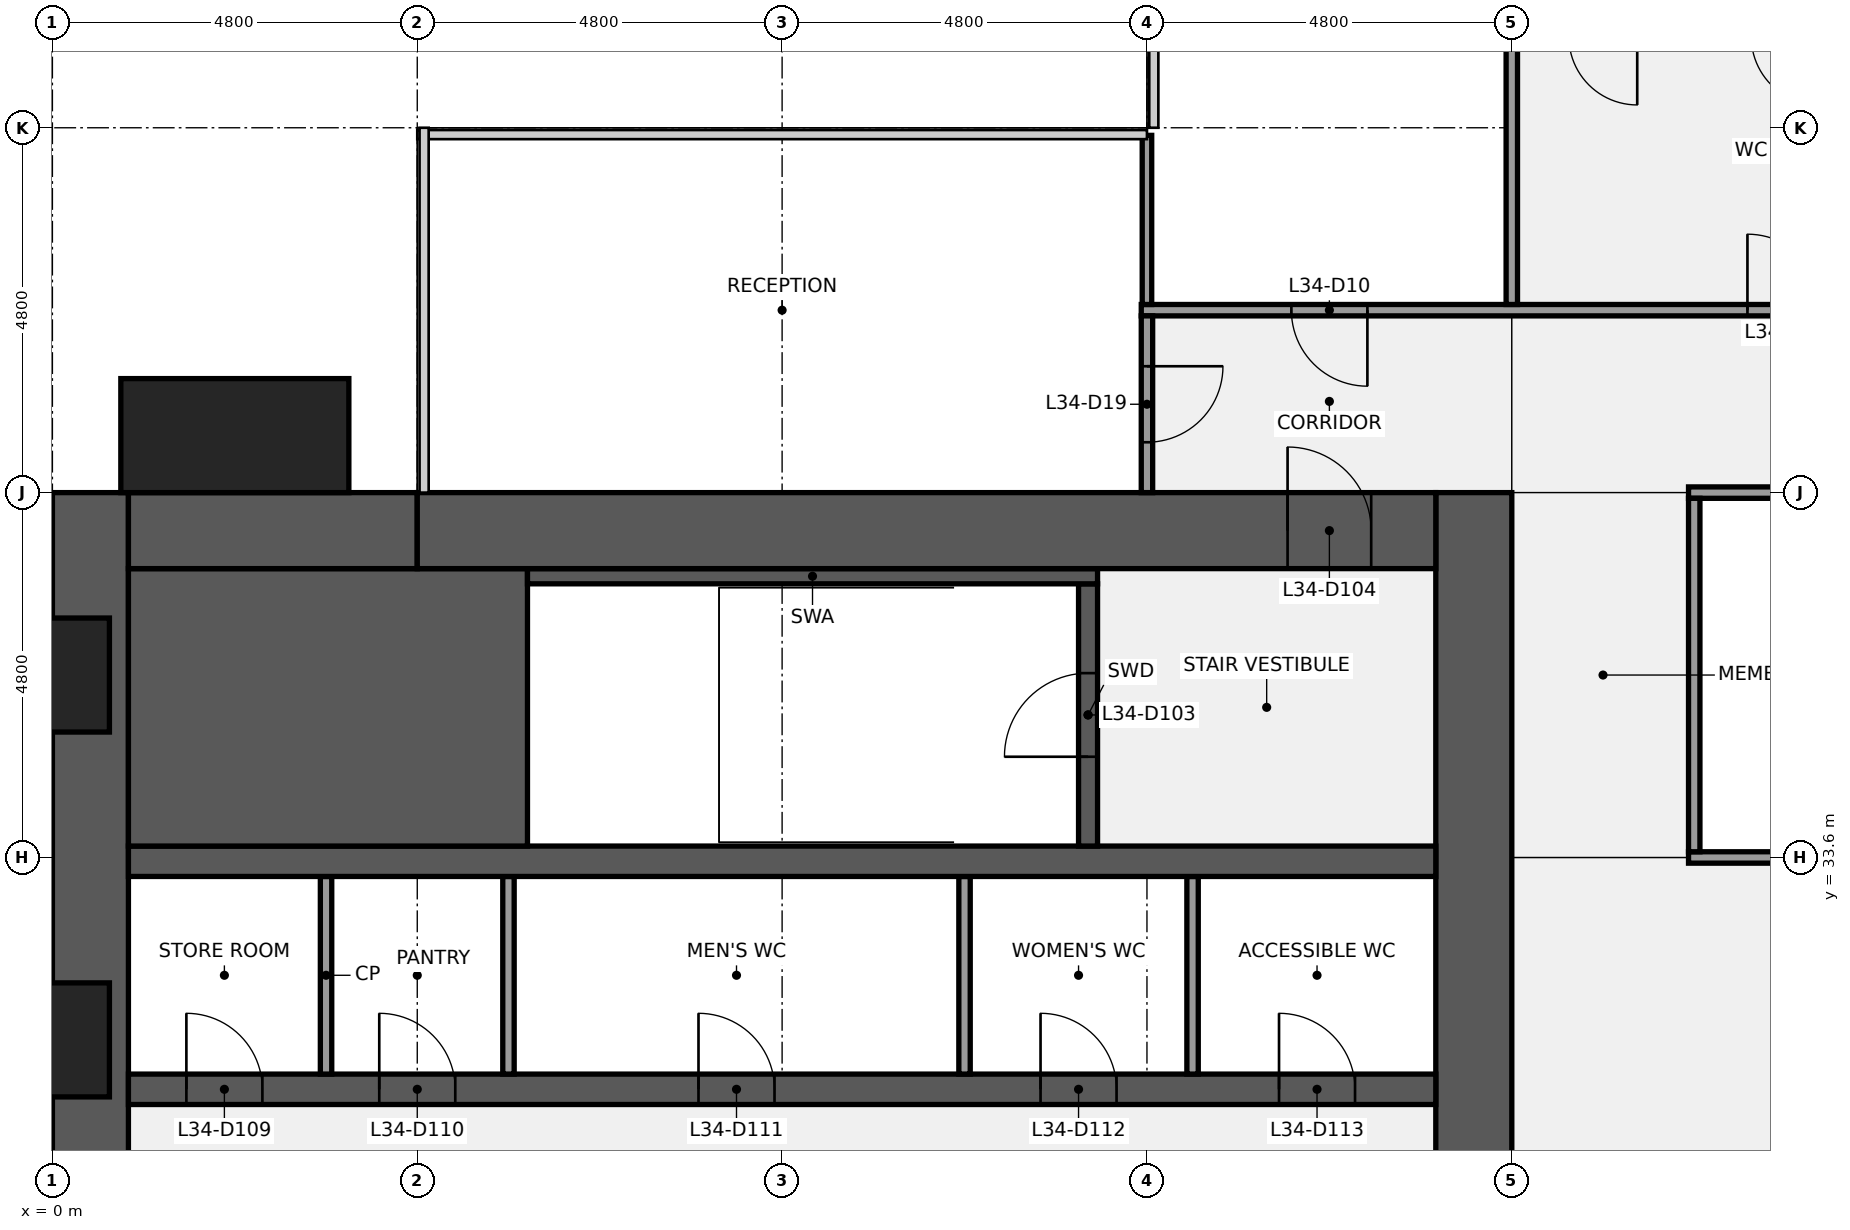
"""IFC4 building model, lengths in metres.
Left out: names, types, materials, properties, quantities, classifications, styles, units other than length and angle.
Written with IfcOpenShell. Run it as: python <this file> out.ifc"""

import sys

from ifc_helpers import new_model, si_unit, direction, frame, frame_2d, origin, origin_2d, place, context, subcontext, project, spatial, rectangle, extrude, element, fill, save


model = new_model("IFC4")
c1 = context("Model", 3, precision=1e-05, world=origin(), true_north=direction((0.0, 1.0)))
c2 = subcontext(c1, "Body", "Model", "MODEL_VIEW")
j1 = project(units=[si_unit("LENGTHUNIT", "METRE"), si_unit("PLANEANGLEUNIT", "RADIAN")], contexts=[c1])
p1 = place(None, origin())
s1 = spatial("IfcSite", under=j1, at=p1, CompositionType="ELEMENT")
p2 = place(p1, origin())
s2 = spatial("IfcBuilding", under=s1, at=p2, CompositionType="ELEMENT")
p3 = place(p2, frame((0.0, 0.0, 156.1)))
s3 = spatial("IfcBuildingStorey", under=s2, at=p3, CompositionType="ELEMENT", Elevation=156.1)
p4 = place(p3, frame((0.5, 9.6, 0.0), z_axis=(0.0, 0.0, 1.0), x_axis=(0.0, 1.0, 0.0)))
e1 = element("IfcWall", 1, at=p4, inside=s3, PredefinedType="SHEAR", context=c2, shape_type="SweptSolid", body=[
    extrude(rectangle(XDim=28.8, YDim=1.0, at=frame_2d((14.4, 0.0))), origin(), (0.0, 0.0, 1.0), 3.84),
])
p5 = place(p4, frame((8.85, 0.0, 0.9)))
e2 = element("IfcOpeningElement", 2, at=p5, cuts=e1, PredefinedType="OPENING", context=c2, shape_type="SweptSolid", body=[
    extrude(rectangle(XDim=1.5, YDim=1.5, at=frame_2d((0.75, 0.75))), frame((0.0, 0.51, 0.0), z_axis=(0.0, -1.0, 0.0), x_axis=(1.0, 0.0, 0.0)), (0.0, 0.0, 1.0), 1.02),
])
p6 = place(p4, frame((18.45, 0.0, 0.9)))
e3 = element("IfcOpeningElement", 3, at=p6, cuts=e1, PredefinedType="OPENING", context=c2, shape_type="SweptSolid", body=[
    extrude(rectangle(XDim=1.5, YDim=1.5, at=frame_2d((0.75, 0.75))), frame((0.0, 0.51, 0.0), z_axis=(0.0, -1.0, 0.0), x_axis=(1.0, 0.0, 0.0)), (0.0, 0.0, 1.0), 1.02),
])
p7 = place(p3, frame((18.7, 38.4, 0.0), z_axis=(0.0, 0.0, 1.0), x_axis=(0.0, -1.0, 0.0)))
e4 = element("IfcWall", 4, at=p7, inside=s3, PredefinedType="SHEAR", context=c2, shape_type="SweptSolid", body=[
    extrude(rectangle(XDim=28.8, YDim=1.0, at=frame_2d((14.4, 0.0))), origin(), (0.0, 0.0, 1.0), 3.84),
])
p8 = place(p7, frame((18.3, 0.0, 0.0)))
e5 = element("IfcOpeningElement", 5, at=p8, cuts=e4, PredefinedType="OPENING", context=c2, shape_type="SweptSolid", body=[
    extrude(rectangle(XDim=1.8, YDim=2.1, at=frame_2d((0.9, 1.05))), frame((0.0, 0.51, 0.0), z_axis=(0.0, -1.0, 0.0), x_axis=(1.0, 0.0, 0.0)), (0.0, 0.0, 1.0), 1.02),
])
p9 = place(p7, frame((8.7, 0.0, 0.0)))
e6 = element("IfcOpeningElement", 6, at=p9, cuts=e4, PredefinedType="OPENING", context=c2, shape_type="SweptSolid", body=[
    extrude(rectangle(XDim=1.8, YDim=2.1, at=frame_2d((0.9, 1.05))), frame((0.0, 0.51, 0.0), z_axis=(0.0, -1.0, 0.0), x_axis=(1.0, 0.0, 0.0)), (0.0, 0.0, 1.0), 1.02),
])
p10 = place(p3, frame((1.0, 30.55, 0.0), z_axis=(0.0, 0.0, 1.0), x_axis=(1.0, 0.0, 0.0)))
e7 = element("IfcWall", 7, at=p10, inside=s3, PredefinedType="SHEAR", context=c2, shape_type="SweptSolid", body=[
    extrude(rectangle(XDim=17.2, YDim=0.4, at=frame_2d((8.6, 0.0))), origin(), (0.0, 0.0, 1.0), 3.84),
])
p11 = place(p10, frame((0.762, 0.0, 0.0)))
e8 = element("IfcOpeningElement", 8, at=p11, cuts=e7, PredefinedType="OPENING", context=c2, shape_type="SweptSolid", body=[
    extrude(rectangle(XDim=1.0, YDim=2.1, at=frame_2d((0.5, 1.05))), frame((0.0, 0.21, 0.0), z_axis=(0.0, -1.0, 0.0), x_axis=(1.0, 0.0, 0.0)), (0.0, 0.0, 1.0), 0.42),
])
p12 = place(p10, frame((3.3, 0.0, 0.0)))
e9 = element("IfcOpeningElement", 9, at=p12, cuts=e7, PredefinedType="OPENING", context=c2, shape_type="SweptSolid", body=[
    extrude(rectangle(XDim=1.0, YDim=2.1, at=frame_2d((0.5, 1.05))), frame((0.0, 0.21, 0.0), z_axis=(0.0, -1.0, 0.0), x_axis=(1.0, 0.0, 0.0)), (0.0, 0.0, 1.0), 0.42),
])
p13 = place(p10, frame((7.5, 0.0, 0.0)))
e10 = element("IfcOpeningElement", 10, at=p13, cuts=e7, PredefinedType="OPENING", context=c2, shape_type="SweptSolid", body=[
    extrude(rectangle(XDim=1.0, YDim=2.1, at=frame_2d((0.5, 1.05))), frame((0.0, 0.21, 0.0), z_axis=(0.0, -1.0, 0.0), x_axis=(1.0, 0.0, 0.0)), (0.0, 0.0, 1.0), 0.42),
])
p14 = place(p10, frame((12.0, 0.0, 0.0)))
e11 = element("IfcOpeningElement", 11, at=p14, cuts=e7, PredefinedType="OPENING", context=c2, shape_type="SweptSolid", body=[
    extrude(rectangle(XDim=1.0, YDim=2.1, at=frame_2d((0.5, 1.05))), frame((0.0, 0.21, 0.0), z_axis=(0.0, -1.0, 0.0), x_axis=(1.0, 0.0, 0.0)), (0.0, 0.0, 1.0), 0.42),
])
p15 = place(p10, frame((15.137, 0.0, 0.0)))
e12 = element("IfcOpeningElement", 12, at=p15, cuts=e7, PredefinedType="OPENING", context=c2, shape_type="SweptSolid", body=[
    extrude(rectangle(XDim=1.0, YDim=2.1, at=frame_2d((0.5, 1.05))), frame((0.0, 0.21, 0.0), z_axis=(0.0, -1.0, 0.0), x_axis=(1.0, 0.0, 0.0)), (0.0, 0.0, 1.0), 0.42),
])
for number, where, z_axis, x_axis in (
    (13, (3.6, 30.75, 0.0), (0.0, 0.0, 1.0), (0.0, 1.0, 0.0)),
    (14, (6.0, 30.75, 0.0), (0.0, 0.0, 1.0), (0.0, 1.0, 0.0)),
    (15, (12.0, 30.75, 0.0), (0.0, 0.0, 1.0), (0.0, 1.0, 0.0)),
    (16, (15.0, 30.75, 0.0), (0.0, 0.0, 1.0), (0.0, 1.0, 0.0)),
):
    element("IfcWall", number, at=place(p3, frame(where, z_axis=z_axis, x_axis=x_axis)), inside=s3, PredefinedType="PARTITIONING", context=c2, shape_type="SweptSolid", body=[
        extrude(rectangle(XDim=2.6, YDim=0.15, at=frame_2d((1.3, 0.0))), origin(), (0.0, 0.0, 1.0), 3.84),
    ])
p16 = place(p3, frame((1.0, 33.55, 0.0), z_axis=(0.0, 0.0, 1.0), x_axis=(1.0, 0.0, 0.0)))
e17 = element("IfcWall", 17, at=p16, inside=s3, PredefinedType="SHEAR", context=c2, shape_type="SweptSolid", body=[
    extrude(rectangle(XDim=17.2, YDim=0.4, at=frame_2d((8.6, 0.0))), origin(), (0.0, 0.0, 1.0), 3.84),
])
p17 = place(p3, frame((1.0, 35.575, 0.0), z_axis=(0.0, 0.0, 1.0), x_axis=(1.0, 0.0, 0.0)))
e18 = element("IfcWall", 18, at=p17, inside=s3, PredefinedType="SHEAR", context=c2, shape_type="SweptSolid", body=[
    extrude(rectangle(XDim=5.25, YDim=3.65, at=frame_2d((2.625, 0.0))), origin(), (0.0, 0.0, 1.0), 3.84),
])
p18 = place(p3, frame((13.625, 33.75, 0.0), z_axis=(0.0, 0.0, 1.0), x_axis=(0.0, 1.0, 0.0)))
e19 = element("IfcWall", 19, at=p18, inside=s3, PredefinedType="SHEAR", context=c2, shape_type="SweptSolid", body=[
    extrude(rectangle(XDim=3.45, YDim=0.25, at=frame_2d((1.725, 0.0))), origin(), (0.0, 0.0, 1.0), 3.84),
])
p19 = place(p18, frame((1.175, 0.0, 0.0)))
e20 = element("IfcOpeningElement", 20, at=p19, cuts=e19, PredefinedType="OPENING", context=c2, shape_type="SweptSolid", body=[
    extrude(rectangle(XDim=1.1, YDim=2.1, at=frame_2d((0.55, 1.05))), frame((0.0, 0.135, 0.0), z_axis=(0.0, -1.0, 0.0), x_axis=(1.0, 0.0, 0.0)), (0.0, 0.0, 1.0), 0.27),
])
p20 = place(p3, frame((6.25, 37.3, 0.0), z_axis=(0.0, 0.0, 1.0), x_axis=(1.0, 0.0, 0.0)))
e21 = element("IfcWall", 21, at=p20, inside=s3, PredefinedType="SHEAR", context=c2, shape_type="SweptSolid", body=[
    extrude(rectangle(XDim=7.5, YDim=0.2, at=frame_2d((3.75, 0.0))), origin(), (0.0, 0.0, 1.0), 3.84),
])
p21 = place(p3, frame((1.0, 37.9, 0.0), z_axis=(0.0, 0.0, 1.0), x_axis=(1.0, 0.0, 0.0)))
e22 = element("IfcWall", 22, at=p21, inside=s3, PredefinedType="SHEAR", context=c2, shape_type="SweptSolid", body=[
    extrude(rectangle(XDim=3.8, YDim=1.0, at=frame_2d((1.9, 0.0))), origin(), (0.0, 0.0, 1.0), 3.84),
])
p22 = place(p3, frame((4.8, 37.9, 0.0), z_axis=(0.0, 0.0, 1.0), x_axis=(1.0, 0.0, 0.0)))
e23 = element("IfcWall", 23, at=p22, inside=s3, PredefinedType="SHEAR", context=c2, shape_type="SweptSolid", body=[
    extrude(rectangle(XDim=13.4, YDim=1.0, at=frame_2d((6.7, 0.0))), origin(), (0.0, 0.0, 1.0), 3.84),
])
p23 = place(p22, frame((11.45, 0.0, 0.0)))
e24 = element("IfcOpeningElement", 24, at=p23, cuts=e23, PredefinedType="OPENING", context=c2, shape_type="SweptSolid", body=[
    extrude(rectangle(XDim=1.1, YDim=2.1, at=frame_2d((0.55, 1.05))), frame((0.0, 0.51, 0.0), z_axis=(0.0, -1.0, 0.0), x_axis=(1.0, 0.0, 0.0)), (0.0, 0.0, 1.0), 1.02),
])
p24 = place(p3, frame((21.525, 33.6, 0.0), z_axis=(0.0, 0.0, 1.0), x_axis=(1.0, 0.0, 0.0)))
e25 = element("IfcWall", 25, at=p24, inside=s3, PredefinedType="PARTITIONING", context=c2, shape_type="SweptSolid", body=[
    extrude(rectangle(XDim=4.95, YDim=0.15, at=frame_2d((2.475, 0.0))), origin(), (0.0, 0.0, 1.0), 2.936),
])
p25 = place(p3, frame((21.525, 38.4, 0.0), z_axis=(0.0, 0.0, 1.0), x_axis=(1.0, 0.0, 0.0)))
e26 = element("IfcWall", 26, at=p25, inside=s3, PredefinedType="PARTITIONING", context=c2, shape_type="SweptSolid", body=[
    extrude(rectangle(XDim=14.55, YDim=0.15, at=frame_2d((7.275, 0.0))), origin(), (0.0, 0.0, 1.0), 2.936),
])
p26 = place(p25, frame((3.175, 0.0, 0.0)))
e27 = element("IfcOpeningElement", 27, at=p26, cuts=e26, PredefinedType="OPENING", context=c2, shape_type="SweptSolid", body=[
    extrude(rectangle(XDim=1.0, YDim=2.1, at=frame_2d((0.5, 1.05))), frame((0.0, 0.085, 0.0), z_axis=(0.0, -1.0, 0.0), x_axis=(1.0, 0.0, 0.0)), (0.0, 0.0, 1.0), 0.17),
])
p27 = place(p25, frame((10.375, 0.0, 0.0)))
e28 = element("IfcOpeningElement", 28, at=p27, cuts=e26, PredefinedType="OPENING", context=c2, shape_type="SweptSolid", body=[
    extrude(rectangle(XDim=1.0, YDim=2.1, at=frame_2d((0.5, 1.05))), frame((0.0, 0.085, 0.0), z_axis=(0.0, -1.0, 0.0), x_axis=(1.0, 0.0, 0.0)), (0.0, 0.0, 1.0), 0.17),
])
p28 = place(p3, frame((14.325, 40.8, 0.0), z_axis=(0.0, 0.0, 1.0), x_axis=(1.0, 0.0, 0.0)))
e29 = element("IfcWall", 29, at=p28, inside=s3, PredefinedType="PARTITIONING", context=c2, shape_type="SweptSolid", body=[
    extrude(rectangle(XDim=28.95, YDim=0.15, at=frame_2d((14.475, 0.0))), origin(), (0.0, 0.0, 1.0), 2.936),
])
p29 = place(p28, frame((1.975, 0.0, 0.0)))
e30 = element("IfcOpeningElement", 30, at=p29, cuts=e29, PredefinedType="OPENING", context=c2, shape_type="SweptSolid", body=[
    extrude(rectangle(XDim=1.0, YDim=2.1, at=frame_2d((0.5, 1.05))), frame((0.0, 0.085, 0.0), z_axis=(0.0, -1.0, 0.0), x_axis=(1.0, 0.0, 0.0)), (0.0, 0.0, 1.0), 0.17),
])
p30 = place(p28, frame((7.975, 0.0, 0.0)))
e31 = element("IfcOpeningElement", 31, at=p30, cuts=e29, PredefinedType="OPENING", context=c2, shape_type="SweptSolid", body=[
    extrude(rectangle(XDim=1.0, YDim=2.1, at=frame_2d((0.5, 1.05))), frame((0.0, 0.085, 0.0), z_axis=(0.0, -1.0, 0.0), x_axis=(1.0, 0.0, 0.0)), (0.0, 0.0, 1.0), 0.17),
])
p31 = place(p28, frame((15.175, 0.0, 0.0)))
e32 = element("IfcOpeningElement", 32, at=p31, cuts=e29, PredefinedType="OPENING", context=c2, shape_type="SweptSolid", body=[
    extrude(rectangle(XDim=1.0, YDim=2.1, at=frame_2d((0.5, 1.05))), frame((0.0, 0.085, 0.0), z_axis=(0.0, -1.0, 0.0), x_axis=(1.0, 0.0, 0.0)), (0.0, 0.0, 1.0), 0.17),
])
p32 = place(p28, frame((21.175, 0.0, 0.0)))
e33 = element("IfcOpeningElement", 33, at=p32, cuts=e29, PredefinedType="OPENING", context=c2, shape_type="SweptSolid", body=[
    extrude(rectangle(XDim=1.0, YDim=2.1, at=frame_2d((0.5, 1.05))), frame((0.0, 0.085, 0.0), z_axis=(0.0, -1.0, 0.0), x_axis=(1.0, 0.0, 0.0)), (0.0, 0.0, 1.0), 0.17),
])
p33 = place(p28, frame((25.975, 0.0, 0.0)))
e34 = element("IfcOpeningElement", 34, at=p33, cuts=e29, PredefinedType="OPENING", context=c2, shape_type="SweptSolid", body=[
    extrude(rectangle(XDim=1.0, YDim=2.1, at=frame_2d((0.5, 1.05))), frame((0.0, 0.085, 0.0), z_axis=(0.0, -1.0, 0.0), x_axis=(1.0, 0.0, 0.0)), (0.0, 0.0, 1.0), 0.17),
])
p34 = place(p3, frame((14.4, 40.875, 0.0), z_axis=(0.0, 0.0, 1.0), x_axis=(0.0, 1.0, 0.0)))
e35 = element("IfcWall", 35, at=p34, inside=s3, PredefinedType="PARTITIONING", context=c2, shape_type="SweptSolid", body=[
    extrude(rectangle(XDim=2.225, YDim=0.125, at=frame_2d((1.113, 0.0))), origin(), (0.0, 0.0, 1.0), 2.936),
])
p35 = place(p3, frame((14.4, 38.4, 0.0), z_axis=(0.0, 0.0, 1.0), x_axis=(0.0, 1.0, 0.0)))
e36 = element("IfcWall", 36, at=p35, inside=s3, PredefinedType="PARTITIONING", context=c2, shape_type="SweptSolid", body=[
    extrude(rectangle(XDim=2.325, YDim=0.15, at=frame_2d((1.163, 0.0))), origin(), (0.0, 0.0, 1.0), 2.936),
])
p36 = place(p35, frame((0.663, 0.0, 0.0)))
e37 = element("IfcOpeningElement", 37, at=p36, cuts=e36, PredefinedType="OPENING", context=c2, shape_type="SweptSolid", body=[
    extrude(rectangle(XDim=1.0, YDim=2.1, at=frame_2d((0.5, 1.05))), frame((0.0, 0.085, 0.0), z_axis=(0.0, -1.0, 0.0), x_axis=(1.0, 0.0, 0.0)), (0.0, 0.0, 1.0), 0.17),
])
p37 = place(p3, frame((19.2, 40.875, 0.0), z_axis=(0.0, 0.0, 1.0), x_axis=(0.0, 1.0, 0.0)))
e38 = element("IfcWall", 38, at=p37, inside=s3, PredefinedType="PARTITIONING", context=c2, shape_type="SweptSolid", body=[
    extrude(rectangle(XDim=3.45, YDim=0.15, at=frame_2d((1.725, 0.0))), origin(), (0.0, 0.0, 1.0), 2.936),
])
p38 = place(p3, frame((21.6, 33.675, 0.0), z_axis=(0.0, 0.0, 1.0), x_axis=(0.0, 1.0, 0.0)))
e39 = element("IfcWall", 39, at=p38, inside=s3, PredefinedType="PARTITIONING", context=c2, shape_type="SweptSolid", body=[
    extrude(rectangle(XDim=4.65, YDim=0.15, at=frame_2d((2.325, 0.0))), origin(), (0.0, 0.0, 1.0), 2.936),
])
p39 = place(p3, frame((2.4, 39.15, 0.0), z_axis=(0.0, 0.0, 1.0), x_axis=(1.0, 0.0, 0.0)))
e40 = element("IfcColumn", 40, at=p39, inside=s3, PredefinedType="PILASTER", context=c2, shape_type="SweptSolid", body=[
    extrude(rectangle(XDim=3.0, YDim=1.5, at=origin_2d()), origin(), (0.0, 0.0, 1.0), 4.0),
])
p40 = place(p19, origin())
e41 = element("IfcDoor", 41, at=p40, inside=s3, OperationType="SINGLE_SWING_LEFT", PredefinedType="DOOR", context=c2, shape_type="SweptSolid", body=[
    extrude(rectangle(XDim=1.1, YDim=2.1, at=frame_2d((0.55, 1.05))), frame((0.0, 0.025, 0.0), z_axis=(0.0, -1.0, 0.0), x_axis=(1.0, 0.0, 0.0)), (0.0, 0.0, 1.0), 0.05),
])
fill(e20, e41)
p41 = place(p23, origin())
e42 = element("IfcDoor", 42, at=p41, inside=s3, OperationType="SINGLE_SWING_LEFT", PredefinedType="DOOR", context=c2, shape_type="SweptSolid", body=[
    extrude(rectangle(XDim=1.1, YDim=2.1, at=frame_2d((0.55, 1.05))), frame((0.0, 0.025, 0.0), z_axis=(0.0, -1.0, 0.0), x_axis=(1.0, 0.0, 0.0)), (0.0, 0.0, 1.0), 0.05),
])
fill(e24, e42)
p42 = place(p11, origin())
e43 = element("IfcDoor", 43, at=p42, inside=s3, OperationType="SINGLE_SWING_LEFT", PredefinedType="DOOR", context=c2, shape_type="SweptSolid", body=[
    extrude(rectangle(XDim=1.0, YDim=2.1, at=frame_2d((0.5, 1.05))), frame((0.0, 0.025, 0.0), z_axis=(0.0, -1.0, 0.0), x_axis=(1.0, 0.0, 0.0)), (0.0, 0.0, 1.0), 0.05),
])
fill(e8, e43)
p43 = place(p12, origin())
e44 = element("IfcDoor", 44, at=p43, inside=s3, OperationType="SINGLE_SWING_LEFT", PredefinedType="DOOR", context=c2, shape_type="SweptSolid", body=[
    extrude(rectangle(XDim=1.0, YDim=2.1, at=frame_2d((0.5, 1.05))), frame((0.0, 0.025, 0.0), z_axis=(0.0, -1.0, 0.0), x_axis=(1.0, 0.0, 0.0)), (0.0, 0.0, 1.0), 0.05),
])
fill(e9, e44)
p44 = place(p13, origin())
e45 = element("IfcDoor", 45, at=p44, inside=s3, OperationType="SINGLE_SWING_LEFT", PredefinedType="DOOR", context=c2, shape_type="SweptSolid", body=[
    extrude(rectangle(XDim=1.0, YDim=2.1, at=frame_2d((0.5, 1.05))), frame((0.0, 0.025, 0.0), z_axis=(0.0, -1.0, 0.0), x_axis=(1.0, 0.0, 0.0)), (0.0, 0.0, 1.0), 0.05),
])
fill(e10, e45)
p45 = place(p14, origin())
e46 = element("IfcDoor", 46, at=p45, inside=s3, OperationType="SINGLE_SWING_LEFT", PredefinedType="DOOR", context=c2, shape_type="SweptSolid", body=[
    extrude(rectangle(XDim=1.0, YDim=2.1, at=frame_2d((0.5, 1.05))), frame((0.0, 0.025, 0.0), z_axis=(0.0, -1.0, 0.0), x_axis=(1.0, 0.0, 0.0)), (0.0, 0.0, 1.0), 0.05),
])
fill(e11, e46)
p46 = place(p15, origin())
e47 = element("IfcDoor", 47, at=p46, inside=s3, OperationType="SINGLE_SWING_LEFT", PredefinedType="DOOR", context=c2, shape_type="SweptSolid", body=[
    extrude(rectangle(XDim=1.0, YDim=2.1, at=frame_2d((0.5, 1.05))), frame((0.0, 0.025, 0.0), z_axis=(0.0, -1.0, 0.0), x_axis=(1.0, 0.0, 0.0)), (0.0, 0.0, 1.0), 0.05),
])
fill(e12, e47)
p47 = place(p29, origin())
e48 = element("IfcDoor", 48, at=p47, inside=s3, OperationType="SINGLE_SWING_RIGHT", PredefinedType="DOOR", context=c2, shape_type="SweptSolid", body=[
    extrude(rectangle(XDim=1.0, YDim=2.1, at=frame_2d((0.5, 1.05))), frame((0.0, 0.025, 0.0), z_axis=(0.0, -1.0, 0.0), x_axis=(1.0, 0.0, 0.0)), (0.0, 0.0, 1.0), 0.05),
])
fill(e30, e48)
p48 = place(p30, origin())
e49 = element("IfcDoor", 49, at=p48, inside=s3, OperationType="SINGLE_SWING_LEFT", PredefinedType="DOOR", context=c2, shape_type="SweptSolid", body=[
    extrude(rectangle(XDim=1.0, YDim=2.1, at=frame_2d((0.5, 1.05))), frame((0.0, 0.025, 0.0), z_axis=(0.0, -1.0, 0.0), x_axis=(1.0, 0.0, 0.0)), (0.0, 0.0, 1.0), 0.05),
])
fill(e31, e49)
p49 = place(p36, origin())
e50 = element("IfcDoor", 50, at=p49, inside=s3, OperationType="SINGLE_SWING_RIGHT", PredefinedType="DOOR", context=c2, shape_type="SweptSolid", body=[
    extrude(rectangle(XDim=1.0, YDim=2.1, at=frame_2d((0.5, 1.05))), frame((0.0, 0.025, 0.0), z_axis=(0.0, -1.0, 0.0), x_axis=(1.0, 0.0, 0.0)), (0.0, 0.0, 1.0), 0.05),
])
fill(e37, e50)
save(model, sys.argv[1])
